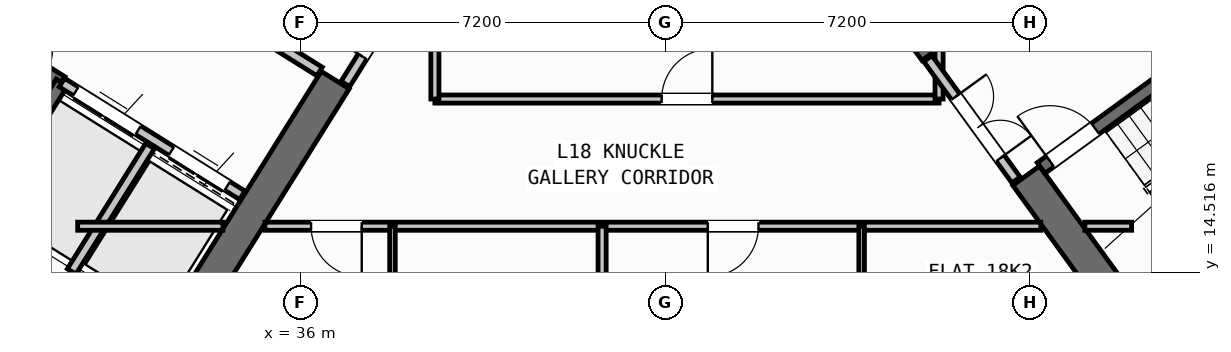
"""IFC4 building model, lengths in metres.
Left out: names, types, materials, properties, quantities, classifications, styles, units other than length and angle.
Written with IfcOpenShell. Run it as: python <this file> out.ifc"""

import sys

from ifc_helpers import new_model, si_unit, direction, frame, frame_2d, origin, place, context, subcontext, project, spatial, rectangle, extrude, source, transform, mapped, element, fill, save


model = new_model("IFC4")
c1 = context("Model", 3, precision=1e-05, world=origin(), true_north=direction((0.0, 1.0)))
c2 = subcontext(c1, "Body", "Model", "MODEL_VIEW")
j1 = project(units=[si_unit("LENGTHUNIT", "METRE"), si_unit("PLANEANGLEUNIT", "RADIAN")], contexts=[c1])
p1 = place(None, origin())
s1 = spatial("IfcSite", under=j1, at=p1, CompositionType="ELEMENT")
p2 = place(p1, origin())
s2 = spatial("IfcBuilding", under=s1, at=p2, CompositionType="ELEMENT")
p3 = place(p2, frame((0.0, 0.0, 71.7)))
s3 = spatial("IfcBuildingStorey", under=s2, at=p3, CompositionType="ELEMENT", Elevation=71.7)
p4 = place(p3, frame((33.409, 12.45, 0.0), z_axis=(0.0, 0.0, 1.0), x_axis=(-0.848051132073, 0.529914405721, 0.0)))
e1 = element("IfcWall", 1, at=p4, inside=s3, PredefinedType="SHEAR", context=c2, shape_type="SweptSolid", body=[
    extrude(rectangle(XDim=13.24, YDim=0.65, at=frame_2d((6.62, 0.0))), origin(), (0.0, 0.0, 1.0), 4.52),
])
p5 = place(p3, frame((36.683, 18.304, 0.0), z_axis=(0.0, 0.0, 1.0), x_axis=(-0.529899109053, -0.848060690178, 0.0)))
e2 = element("IfcWall", 2, at=p5, inside=s3, PredefinedType="SHEAR", context=c2, shape_type="SweptSolid", body=[
    extrude(rectangle(XDim=6.375, YDim=0.65, at=frame_2d((3.188, 0.0))), origin(), (0.0, 0.0, 1.0), 4.52),
])
p6 = place(p3, frame((52.318, 13.11, 0.0), z_axis=(0.0, 0.0, 1.0), x_axis=(0.809019445368, 0.587781878776, 0.0)))
e3 = element("IfcWall", 3, at=p6, inside=s3, PredefinedType="SHEAR", context=c2, shape_type="SweptSolid", body=[
    extrude(rectangle(XDim=12.44, YDim=0.65, at=frame_2d((6.22, 0.0))), origin(), (0.0, 0.0, 1.0), 4.52),
])
p7 = place(p3, frame((52.39, 13.564, 0.0), z_axis=(0.0, 0.0, 1.0), x_axis=(-0.58779688989, 0.809008539037, 0.0)))
e4 = element("IfcWall", 4, at=p7, inside=s3, PredefinedType="SHEAR", context=c2, shape_type="SweptSolid", body=[
    extrude(rectangle(XDim=3.525, YDim=0.65, at=frame_2d((1.763, 0.0))), origin(), (0.0, 0.0, 1.0), 4.52),
])
p8 = place(p3, frame((48.526, 18.884, 0.0), z_axis=(0.0, 0.0, 1.0), x_axis=(-0.58777996584, 0.809020835181, 0.0)))
e5 = element("IfcWall", 5, at=p8, inside=s3, PredefinedType="SHEAR", context=c2, shape_type="SweptSolid", body=[
    extrude(rectangle(XDim=6.375, YDim=0.65, at=frame_2d((3.188, 0.0))), origin(), (0.0, 0.0, 1.0), 4.52),
])
p9 = place(p3, frame((31.76, 12.183, 0.0), z_axis=(0.0, 0.0, 1.0), x_axis=(-0.848047074256, 0.529920899612, 0.0)))
e6 = element("IfcWall", 6, at=p9, inside=s3, PredefinedType="STANDARD", context=c2, shape_type="SweptSolid", body=[
    extrude(rectangle(XDim=30.652, YDim=0.32, at=frame_2d((15.326, 0.0))), origin(), (0.0, 0.0, 1.0), 4.52),
])
p10 = place(p9, frame((20.241, 0.0, 0.0)))
e7 = element("IfcOpeningElement", 7, at=p10, cuts=e6, PredefinedType="OPENING", context=c2, shape_type="SweptSolid", body=[
    extrude(rectangle(XDim=1.2, YDim=2.15, at=frame_2d((0.6, 1.075))), frame((0.0, 0.17, 0.0), z_axis=(0.0, -1.0, 0.0), x_axis=(1.0, 0.0, 0.0)), (0.0, 0.0, 1.0), 0.34),
])
p11 = place(p9, frame((14.781, 0.0, 0.0)))
e8 = element("IfcOpeningElement", 8, at=p11, cuts=e6, PredefinedType="OPENING", context=c2, shape_type="SweptSolid", body=[
    extrude(rectangle(XDim=1.5, YDim=2.25, at=frame_2d((0.75, 1.125))), frame((0.0, 0.17, 0.0), z_axis=(0.0, -1.0, 0.0), x_axis=(1.0, 0.0, 0.0)), (0.0, 0.0, 1.0), 0.34),
])
p12 = place(p9, frame((1.84, 0.0, 0.75)))
e9 = element("IfcOpeningElement", 9, at=p12, cuts=e6, PredefinedType="OPENING", context=c2, shape_type="SweptSolid", body=[
    extrude(rectangle(XDim=2.4, YDim=1.6, at=frame_2d((1.2, 0.8))), frame((0.0, 0.17, 0.0), z_axis=(0.0, -1.0, 0.0), x_axis=(1.0, 0.0, 0.0)), (0.0, 0.0, 1.0), 0.34),
])
p13 = place(p9, frame((7.019, 0.0, 0.75)))
e10 = element("IfcOpeningElement", 10, at=p13, cuts=e6, PredefinedType="OPENING", context=c2, shape_type="SweptSolid", body=[
    extrude(rectangle(XDim=2.4, YDim=1.6, at=frame_2d((1.2, 0.8))), frame((0.0, 0.17, 0.0), z_axis=(0.0, -1.0, 0.0), x_axis=(1.0, 0.0, 0.0)), (0.0, 0.0, 1.0), 0.34),
])
p14 = place(p9, frame((25.841, 0.0, 0.95)))
e11 = element("IfcOpeningElement", 11, at=p14, cuts=e6, PredefinedType="OPENING", context=c2, shape_type="SweptSolid", body=[
    extrude(rectangle(XDim=1.2, YDim=1.4, at=frame_2d((0.6, 0.7))), frame((0.0, 0.17, 0.0), z_axis=(0.0, -1.0, 0.0), x_axis=(1.0, 0.0, 0.0)), (0.0, 0.0, 1.0), 0.34),
])
p15 = place(p3, frame((31.28, 18.261, 0.0), z_axis=(0.0, 0.0, 1.0), x_axis=(-0.848051618787, 0.529913626805, 0.0)))
e12 = element("IfcWall", 12, at=p15, inside=s3, PredefinedType="SHEAR", context=c2, shape_type="SweptSolid", body=[
    extrude(rectangle(XDim=7.46, YDim=0.26, at=frame_2d((3.73, 0.0))), origin(), (0.0, 0.0, 1.0), 4.52),
])
p16 = place(p15, frame((0.36, 0.0, 0.0)))
e13 = element("IfcOpeningElement", 13, at=p16, cuts=e12, PredefinedType="OPENING", context=c2, shape_type="SweptSolid", body=[
    extrude(rectangle(XDim=0.86, YDim=2.05, at=frame_2d((0.43, 1.025))), frame((0.0, 0.14, 0.0), z_axis=(0.0, -1.0, 0.0), x_axis=(1.0, 0.0, 0.0)), (0.0, 0.0, 1.0), 0.28),
])
p17 = place(p3, frame((31.288, 18.256, 0.0), z_axis=(0.0, 0.0, 1.0), x_axis=(-0.529943379326, -0.848033026897, 0.0)))
e14 = element("IfcWall", 14, at=p17, inside=s3, PredefinedType="SHEAR", context=c2, shape_type="SweptSolid", body=[
    extrude(rectangle(XDim=3.16, YDim=0.26, at=frame_2d((1.58, 0.0))), origin(), (0.0, 0.0, 1.0), 4.52),
])
p18 = place(p3, frame((34.848, 16.031, 0.0), z_axis=(0.0, 0.0, 1.0), x_axis=(-0.848044042236, 0.529925751807, 0.0)))
e15 = element("IfcWall", 15, at=p18, inside=s3, PredefinedType="STANDARD", context=c2, shape_type="SweptSolid", body=[
    extrude(rectangle(XDim=4.198, YDim=0.2, at=frame_2d((2.099, 0.0))), origin(), (0.0, 0.0, 1.0), 4.51),
])
p19 = place(p18, frame((0.348, 0.0, 0.0)))
e16 = element("IfcOpeningElement", 16, at=p19, cuts=e15, PredefinedType="OPENING", context=c2, shape_type="SweptSolid", body=[
    extrude(rectangle(XDim=1.3, YDim=2.2, at=frame_2d((0.65, 1.1))), frame((0.0, 0.11, 0.0), z_axis=(0.0, -1.0, 0.0), x_axis=(1.0, 0.0, 0.0)), (0.0, 0.0, 1.0), 0.22),
])
p20 = place(p18, frame((2.423, 0.0, 0.0)))
e17 = element("IfcOpeningElement", 17, at=p20, cuts=e15, PredefinedType="OPENING", context=c2, shape_type="SweptSolid", body=[
    extrude(rectangle(XDim=1.45, YDim=2.25, at=frame_2d((0.725, 1.125))), frame((0.0, 0.11, 0.0), z_axis=(0.0, -1.0, 0.0), x_axis=(1.0, 0.0, 0.0)), (0.0, 0.0, 1.0), 0.22),
])
p21 = place(p3, frame((36.374, 18.474, 0.0), z_axis=(0.0, 0.0, 1.0), x_axis=(-0.848051071577, 0.529914502535, 0.0)))
e18 = element("IfcWall", 18, at=p21, inside=s3, PredefinedType="STANDARD", context=c2, shape_type="SweptSolid", body=[
    extrude(rectangle(XDim=5.718, YDim=0.2, at=frame_2d((2.859, 0.0))), origin(), (0.0, 0.0, 1.0), 4.51),
])
p22 = place(p21, frame((2.498, 0.0, 0.0)))
e19 = element("IfcOpeningElement", 19, at=p22, cuts=e18, PredefinedType="OPENING", context=c2, shape_type="SweptSolid", body=[
    extrude(rectangle(XDim=1.15, YDim=2.1, at=frame_2d((0.575, 1.05))), frame((0.0, 0.11, 0.0), z_axis=(0.0, -1.0, 0.0), x_axis=(1.0, 0.0, 0.0)), (0.0, 0.0, 1.0), 0.22),
])
p23 = place(p3, frame((33.029, 17.003, 0.0), z_axis=(0.0, 0.0, 1.0), x_axis=(-0.529916267533, -0.848049968695, 0.0)))
e20 = element("IfcWall", 20, at=p23, inside=s3, PredefinedType="STANDARD", context=c2, shape_type="SweptSolid", body=[
    extrude(rectangle(XDim=2.92, YDim=0.2, at=frame_2d((1.46, 0.0))), origin(), (0.0, 0.0, 1.0), 4.51),
])
p24 = place(p3, frame((52.472, 14.013, 0.0), z_axis=(0.0, 0.0, 1.0), x_axis=(0.809028366311, 0.587769599847, 0.0)))
e21 = element("IfcWall", 21, at=p24, inside=s3, PredefinedType="SHEAR", context=c2, shape_type="SweptSolid", body=[
    extrude(rectangle(XDim=7.33, YDim=0.26, at=frame_2d((3.665, 0.0))), origin(), (0.0, 0.0, 1.0), 4.52),
])
p25 = place(p3, frame((50.615, 16.57, 0.0), z_axis=(0.0, 0.0, 1.0), x_axis=(0.809028366311, 0.587769599847, 0.0)))
e22 = element("IfcWall", 22, at=p25, inside=s3, PredefinedType="SHEAR", context=c2, shape_type="SweptSolid", body=[
    extrude(rectangle(XDim=7.33, YDim=0.26, at=frame_2d((3.665, 0.0))), origin(), (0.0, 0.0, 1.0), 4.52),
])
p26 = place(p25, frame((0.22, 0.0, 0.0)))
e23 = element("IfcOpeningElement", 23, at=p26, cuts=e22, PredefinedType="OPENING", context=c2, shape_type="SweptSolid", body=[
    extrude(rectangle(XDim=1.1, YDim=2.1, at=frame_2d((0.55, 1.05))), frame((0.0, 0.14, 0.0), z_axis=(0.0, -1.0, 0.0), x_axis=(1.0, 0.0, 0.0)), (0.0, 0.0, 1.0), 0.28),
])
p27 = place(p3, frame((38.451, 20.737, 0.0), z_axis=(0.0, 0.0, 1.0), x_axis=(-0.529924799939, -0.848044637038, 0.0)))
e24 = element("IfcWall", 24, at=p27, inside=s3, PredefinedType="STANDARD", context=c2, shape_type="SweptSolid", body=[
    extrude(rectangle(XDim=2.96, YDim=0.2, at=frame_2d((1.48, 0.0))), origin(), (0.0, 0.0, 1.0), 4.51),
])
p28 = place(p27, frame((1.46, 0.0, 0.0)))
e25 = element("IfcOpeningElement", 25, at=p28, cuts=e24, PredefinedType="OPENING", context=c2, shape_type="SweptSolid", body=[
    extrude(rectangle(XDim=0.86, YDim=2.05, at=frame_2d((0.43, 1.025))), frame((0.0, 0.11, 0.0), z_axis=(0.0, -1.0, 0.0), x_axis=(1.0, 0.0, 0.0)), (0.0, 0.0, 1.0), 0.22),
])
p29 = place(p3, frame((31.6, 15.42, 0.0), z_axis=(0.0, 0.0, 1.0), x_axis=(1.0, 0.0, 0.0)))
e26 = element("IfcWall", 26, at=p29, inside=s3, PredefinedType="PARTITIONING", context=c2, shape_type="SweptSolid", body=[
    extrude(rectangle(XDim=2.866, YDim=0.16, at=frame_2d((1.433, 0.0))), origin(), (0.0, 0.0, 1.0), 4.51),
])
p30 = place(p3, frame((35.296, 15.42, 0.0), z_axis=(0.0, 0.0, 1.0), x_axis=(1.0, 0.0, 0.0)))
e27 = element("IfcWall", 27, at=p30, inside=s3, PredefinedType="PARTITIONING", context=c2, shape_type="SweptSolid", body=[
    extrude(rectangle(XDim=15.311, YDim=0.16, at=frame_2d((7.655, 0.0))), origin(), (0.0, 0.0, 1.0), 4.51),
])
p31 = place(p30, frame((0.91, 0.0, 0.0)))
e28 = element("IfcOpeningElement", 28, at=p31, cuts=e27, PredefinedType="OPENING", context=c2, shape_type="SweptSolid", body=[
    extrude(rectangle(XDim=1.0, YDim=2.1, at=frame_2d((0.5, 1.05))), frame((0.0, 0.09, 0.0), z_axis=(0.0, -1.0, 0.0), x_axis=(1.0, 0.0, 0.0)), (0.0, 0.0, 1.0), 0.18),
])
p32 = place(p30, frame((8.74, 0.0, 0.0)))
e29 = element("IfcOpeningElement", 29, at=p32, cuts=e27, PredefinedType="OPENING", context=c2, shape_type="SweptSolid", body=[
    extrude(rectangle(XDim=1.0, YDim=2.1, at=frame_2d((0.5, 1.05))), frame((0.0, 0.09, 0.0), z_axis=(0.0, -1.0, 0.0), x_axis=(1.0, 0.0, 0.0)), (0.0, 0.0, 1.0), 0.18),
])
p33 = place(p3, frame((51.477, 15.42, 0.0), z_axis=(0.0, 0.0, 1.0), x_axis=(1.0, 0.0, 0.0)))
e30 = element("IfcWall", 30, at=p33, inside=s3, PredefinedType="PARTITIONING", context=c2, shape_type="SweptSolid", body=[
    extrude(rectangle(XDim=0.923, YDim=0.16, at=frame_2d((0.461, 0.0))), origin(), (0.0, 0.0, 1.0), 4.51),
])
p34 = place(p3, frame((38.65, 17.93, 0.0), z_axis=(0.0, 0.0, 1.0), x_axis=(1.0, 0.0, 0.0)))
e31 = element("IfcWall", 31, at=p34, inside=s3, PredefinedType="PARTITIONING", context=c2, shape_type="SweptSolid", body=[
    extrude(rectangle(XDim=9.95, YDim=0.16, at=frame_2d((4.975, 0.0))), origin(), (0.0, 0.0, 1.0), 4.51),
])
p35 = place(p34, frame((4.475, 0.0, 0.0)))
e32 = element("IfcOpeningElement", 32, at=p35, cuts=e31, PredefinedType="OPENING", context=c2, shape_type="SweptSolid", body=[
    extrude(rectangle(XDim=1.0, YDim=2.1, at=frame_2d((0.5, 1.05))), frame((0.0, 0.09, 0.0), z_axis=(0.0, -1.0, 0.0), x_axis=(1.0, 0.0, 0.0)), (0.0, 0.0, 1.0), 0.18),
])
p36 = place(p3, frame((38.65, 17.93, 0.0), z_axis=(0.0, 0.0, 1.0), x_axis=(0.0, 1.0, 0.0)))
e33 = element("IfcWall", 33, at=p36, inside=s3, PredefinedType="PARTITIONING", context=c2, shape_type="SweptSolid", body=[
    extrude(rectangle(XDim=2.857, YDim=0.16, at=frame_2d((1.428, 0.0))), origin(), (0.0, 0.0, 1.0), 4.51),
])
p37 = place(p3, frame((48.6, 17.93, 0.0), z_axis=(0.0, 0.0, 1.0), x_axis=(0.0, 1.0, 0.0)))
e34 = element("IfcWall", 34, at=p37, inside=s3, PredefinedType="PARTITIONING", context=c2, shape_type="SweptSolid", body=[
    extrude(rectangle(XDim=0.993, YDim=0.16, at=frame_2d((0.496, 0.0))), origin(), (0.0, 0.0, 1.0), 4.51),
])
p38 = place(p3, frame((50.119, 16.333, 0.0), z_axis=(0.0, 0.0, 1.0), x_axis=(-0.587749856981, 0.809042709391, 0.0)))
e35 = element("IfcWall", 35, at=p38, inside=s3, PredefinedType="STANDARD", context=c2, shape_type="SweptSolid", body=[
    extrude(rectangle(XDim=2.96, YDim=0.2, at=frame_2d((1.48, 0.0))), origin(), (0.0, 0.0, 1.0), 4.51),
])
p39 = place(p38, frame((0.53, 0.0, 0.0)))
e36 = element("IfcOpeningElement", 36, at=p39, cuts=e35, PredefinedType="OPENING", context=c2, shape_type="SweptSolid", body=[
    extrude(rectangle(XDim=1.5, YDim=2.15, at=frame_2d((0.75, 1.075))), frame((0.0, 0.11, 0.0), z_axis=(0.0, -1.0, 0.0), x_axis=(1.0, 0.0, 0.0)), (0.0, 0.0, 1.0), 0.22),
])
p40 = place(p3, frame((41.95, 1.96, 0.0), z_axis=(0.0, 0.0, 1.0), x_axis=(0.0, 1.0, 0.0)))
e37 = element("IfcWall", 37, at=p40, inside=s3, PredefinedType="PARTITIONING", context=c2, shape_type="SweptSolid", body=[
    extrude(rectangle(XDim=13.46, YDim=0.16, at=frame_2d((6.73, 0.0))), origin(), (0.0, 0.0, 1.0), 4.51),
])
p41 = place(p3, frame((37.813, 1.96, 0.0), z_axis=(0.0, 0.0, 1.0), x_axis=(0.0, 1.0, 0.0)))
e38 = element("IfcWall", 38, at=p41, inside=s3, PredefinedType="PARTITIONING", context=c2, shape_type="SweptSolid", body=[
    extrude(rectangle(XDim=13.46, YDim=0.11, at=frame_2d((6.73, 0.0))), origin(), (0.0, 0.0, 1.0), 4.51),
])
p42 = place(p41, frame((5.5, 0.0, 0.0)))
e39 = element("IfcOpeningElement", 39, at=p42, cuts=e38, PredefinedType="OPENING", context=c2, shape_type="SweptSolid", body=[
    extrude(rectangle(XDim=0.92, YDim=2.08, at=frame_2d((0.46, 1.04))), frame((0.0, 0.065, 0.0), z_axis=(0.0, -1.0, 0.0), x_axis=(1.0, 0.0, 0.0)), (0.0, 0.0, 1.0), 0.13),
])
p43 = place(p41, frame((10.89, 0.0, 0.0)))
e40 = element("IfcOpeningElement", 40, at=p43, cuts=e38, PredefinedType="OPENING", context=c2, shape_type="SweptSolid", body=[
    extrude(rectangle(XDim=0.88, YDim=2.08, at=frame_2d((0.44, 1.04))), frame((0.0, 0.065, 0.0), z_axis=(0.0, -1.0, 0.0), x_axis=(1.0, 0.0, 0.0)), (0.0, 0.0, 1.0), 0.13),
])
p44 = place(p3, frame((47.072, 1.96, 0.0), z_axis=(0.0, 0.0, 1.0), x_axis=(0.0, 1.0, 0.0)))
e41 = element("IfcWall", 41, at=p44, inside=s3, PredefinedType="PARTITIONING", context=c2, shape_type="SweptSolid", body=[
    extrude(rectangle(XDim=13.46, YDim=0.11, at=frame_2d((6.73, 0.0))), origin(), (0.0, 0.0, 1.0), 4.51),
])
p45 = place(p44, frame((6.6, 0.0, 0.0)))
e42 = element("IfcOpeningElement", 42, at=p45, cuts=e41, PredefinedType="OPENING", context=c2, shape_type="SweptSolid", body=[
    extrude(rectangle(XDim=0.92, YDim=2.08, at=frame_2d((0.46, 1.04))), frame((0.0, 0.065, 0.0), z_axis=(0.0, -1.0, 0.0), x_axis=(1.0, 0.0, 0.0)), (0.0, 0.0, 1.0), 0.13),
])
p46 = place(p44, frame((11.54, 0.0, 0.0)))
e43 = element("IfcOpeningElement", 43, at=p46, cuts=e41, PredefinedType="OPENING", context=c2, shape_type="SweptSolid", body=[
    extrude(rectangle(XDim=0.88, YDim=2.08, at=frame_2d((0.44, 1.04))), frame((0.0, 0.065, 0.0), z_axis=(0.0, -1.0, 0.0), x_axis=(1.0, 0.0, 0.0)), (0.0, 0.0, 1.0), 0.13),
])
m1 = source(origin(), c2, "Body", "SweptSolid", [
    extrude(rectangle(XDim=1.3, YDim=2.2, at=frame_2d((0.65, 1.1))), frame((0.0, 0.025, 0.0), z_axis=(0.0, -1.0, 0.0), x_axis=(1.0, 0.0, 0.0)), (0.0, 0.0, 1.0), 0.05),
])
p47 = place(p19, origin())
e44 = element("IfcDoor", 44, at=p47, inside=s3, OperationType="DOUBLE_DOOR_SLIDING", PredefinedType="DOOR", context=c2, shape_type="MappedRepresentation", body=[
    mapped(m1, transform((0.0, 0.0, 0.0), scale=1.0)),
])
fill(e16, e44)
m2 = source(origin(), c2, "Body", "SweptSolid", [
    extrude(rectangle(XDim=1.45, YDim=2.25, at=frame_2d((0.725, 1.125))), frame((0.0, 0.025, 0.0), z_axis=(0.0, -1.0, 0.0), x_axis=(1.0, 0.0, 0.0)), (0.0, 0.0, 1.0), 0.05),
])
p48 = place(p20, origin())
e45 = element("IfcDoor", 45, at=p48, inside=s3, OperationType="DOUBLE_DOOR_SLIDING", PredefinedType="DOOR", context=c2, shape_type="MappedRepresentation", body=[
    mapped(m2, transform((0.0, 0.0, 0.0), scale=1.0)),
])
fill(e17, e45)
m3 = source(origin(), c2, "Body", "SweptSolid", [
    extrude(rectangle(XDim=1.1, YDim=2.1, at=frame_2d((0.55, 1.05))), frame((0.0, 0.025, 0.0), z_axis=(0.0, -1.0, 0.0), x_axis=(1.0, 0.0, 0.0)), (0.0, 0.0, 1.0), 0.05),
])
p49 = place(p26, origin())
e46 = element("IfcDoor", 46, at=p49, inside=s3, OperationType="SINGLE_SWING_LEFT", PredefinedType="DOOR", context=c2, shape_type="MappedRepresentation", body=[
    mapped(m3, transform((0.0, 0.0, 0.0), scale=1.0)),
])
fill(e23, e46)
m4 = source(origin(), c2, "Body", "SweptSolid", [
    extrude(rectangle(XDim=1.0, YDim=2.1, at=frame_2d((0.5, 1.05))), frame((0.0, 0.025, 0.0), z_axis=(0.0, -1.0, 0.0), x_axis=(1.0, 0.0, 0.0)), (0.0, 0.0, 1.0), 0.05),
])
p50 = place(p35, origin())
e47 = element("IfcDoor", 47, at=p50, inside=s3, OperationType="SINGLE_SWING_RIGHT", PredefinedType="DOOR", context=c2, shape_type="MappedRepresentation", body=[
    mapped(m4, transform((0.0, 0.0, 0.0), scale=1.0)),
])
fill(e32, e47)
m5 = source(origin(), c2, "Body", "SweptSolid", [
    extrude(rectangle(XDim=0.86, YDim=2.05, at=frame_2d((0.43, 1.025))), frame((0.0, 0.025, 0.0), z_axis=(0.0, -1.0, 0.0), x_axis=(1.0, 0.0, 0.0)), (0.0, 0.0, 1.0), 0.05),
])
p51 = place(p28, frame((0.86, 0.0, 0.0), z_axis=(0.0, 0.0, 1.0), x_axis=(-1.0, 0.0, 0.0)))
e48 = element("IfcDoor", 48, at=p51, inside=s3, OperationType="SINGLE_SWING_LEFT", PredefinedType="DOOR", context=c2, shape_type="MappedRepresentation", body=[
    mapped(m5, transform((0.0, 0.0, 0.0), scale=1.0)),
])
fill(e25, e48)
m6 = source(origin(), c2, "Body", "SweptSolid", [
    extrude(rectangle(XDim=1.5, YDim=2.15, at=frame_2d((0.75, 1.075))), frame((0.0, 0.025, 0.0), z_axis=(0.0, -1.0, 0.0), x_axis=(1.0, 0.0, 0.0)), (0.0, 0.0, 1.0), 0.05),
])
p52 = place(p39, frame((1.5, 0.0, 0.0), z_axis=(0.0, 0.0, 1.0), x_axis=(-1.0, 0.0, 0.0)))
e49 = element("IfcDoor", 49, at=p52, inside=s3, OperationType="DOUBLE_DOOR_SINGLE_SWING", PredefinedType="DOOR", context=c2, shape_type="MappedRepresentation", body=[
    mapped(m6, transform((0.0, 0.0, 0.0), scale=1.0)),
])
fill(e36, e49)
p53 = place(p31, frame((1.0, 0.0, 0.0), z_axis=(0.0, 0.0, 1.0), x_axis=(-1.0, 0.0, 0.0)))
e50 = element("IfcDoor", 50, at=p53, inside=s3, OperationType="SINGLE_SWING_LEFT", PredefinedType="DOOR", context=c2, shape_type="MappedRepresentation", body=[
    mapped(m4, transform((0.0, 0.0, 0.0), scale=1.0)),
])
fill(e28, e50)
p54 = place(p32, frame((1.0, 0.0, 0.0), z_axis=(0.0, 0.0, 1.0), x_axis=(-1.0, 0.0, 0.0)))
e51 = element("IfcDoor", 51, at=p54, inside=s3, OperationType="SINGLE_SWING_RIGHT", PredefinedType="DOOR", context=c2, shape_type="MappedRepresentation", body=[
    mapped(m4, transform((0.0, 0.0, 0.0), scale=1.0)),
])
fill(e29, e51)
save(model, sys.argv[1])
